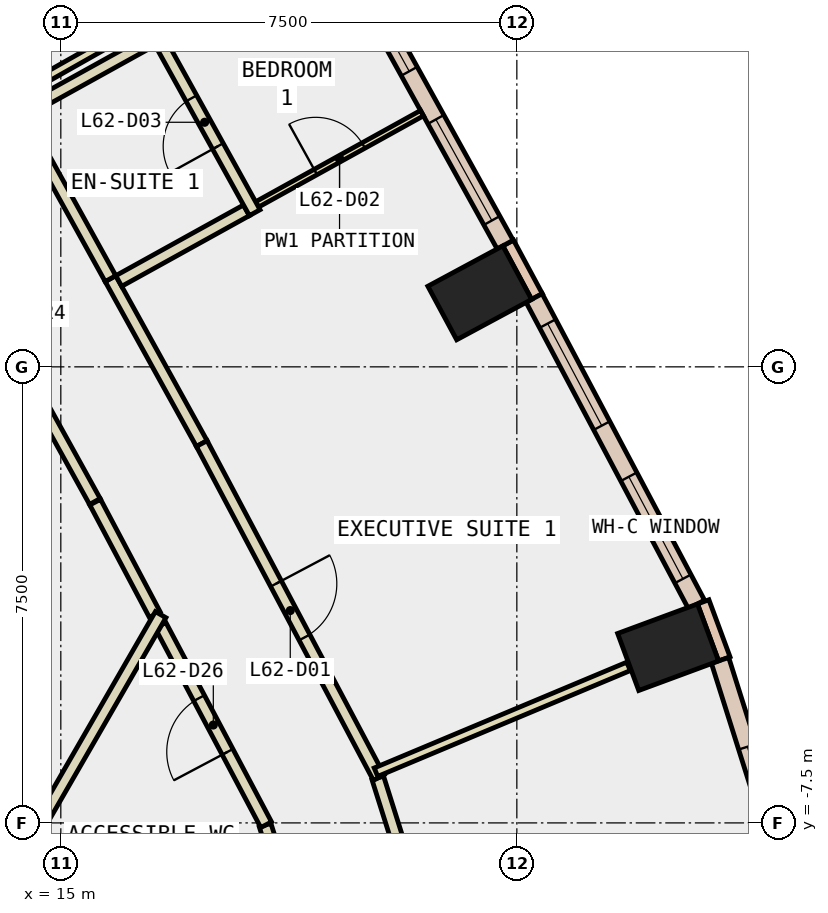
"""IFC4 building model, lengths in metres.
Left out: names, types, materials, properties, quantities, classifications, styles, units other than length and angle.
Written with IfcOpenShell. Run it as: python <this file> out.ifc"""

import sys

from ifc_helpers import new_model, si_unit, direction, frame, frame_2d, origin, origin_2d, place, context, subcontext, project, spatial, rectangle, extrude, element, fill, save


model = new_model("IFC4")
c1 = context("Model", 3, precision=1e-05, world=origin(), true_north=direction((0.0, 1.0)))
c2 = subcontext(c1, "Body", "Model", "MODEL_VIEW")
j1 = project(units=[si_unit("LENGTHUNIT", "METRE"), si_unit("PLANEANGLEUNIT", "RADIAN")], contexts=[c1])
p1 = place(None, origin())
s1 = spatial("IfcSite", under=j1, at=p1, CompositionType="ELEMENT")
p2 = place(p1, origin())
s2 = spatial("IfcBuilding", under=s1, at=p2, CompositionType="ELEMENT")
p3 = place(p2, frame((0.0, 0.0, 270.2)))
s3 = spatial("IfcBuildingStorey", under=s2, at=p3, CompositionType="ELEMENT", Elevation=270.2)
for number, where, z_axis, x_axis in (
    (1, (24.988, -4.611, -0.34), (0.0, 0.0, 1.0), (-0.347, 0.938, 0.0)),
    (2, (21.89, 1.217, -0.34), (0.0, 0.0, 1.0), (-0.474, 0.881, 0.0)),
):
    element("IfcColumn", number, at=place(p3, frame(where, z_axis=z_axis, x_axis=x_axis)), inside=s3, PredefinedType="COLUMN", context=c2, shape_type="SweptSolid", body=[
        extrude(rectangle(XDim=1.0, YDim=1.4, at=origin_2d()), origin(), (0.0, 0.0, 1.0), 3.6),
    ])
p4 = place(p3, frame((7.578, -4.375, -0.34), z_axis=(0.0, 0.0, 1.0), x_axis=(0.866024315419, -0.5000018851, 0.0)))
e3 = element("IfcWall", 3, at=p4, inside=s3, PredefinedType="SHEAR", context=c2, shape_type="SweptSolid", body=[
    extrude(rectangle(XDim=9.0, YDim=0.8, at=frame_2d((4.5, 0.0))), origin(), (0.0, 0.0, 1.0), 3.6),
])
p5 = place(p3, frame((25.912, -4.803, 0.0), z_axis=(0.0, 0.0, 1.0), x_axis=(-0.347107644204, 0.937825294677, 0.0)))
e4 = element("IfcWall", 4, at=p5, inside=s3, PredefinedType="STANDARD", context=c2, shape_type="SweptSolid", body=[
    extrude(rectangle(XDim=1.0, YDim=0.2, at=frame_2d((0.5, 0.0))), origin(), (0.0, 0.0, 1.0), 3.26),
])
p6 = place(p3, frame((22.831, 1.156, 0.0), z_axis=(0.0, 0.0, 1.0), x_axis=(-0.473852444207, 0.880604259085, 0.0)))
e5 = element("IfcWall", 5, at=p6, inside=s3, PredefinedType="STANDARD", context=c2, shape_type="SweptSolid", body=[
    extrude(rectangle(XDim=1.0, YDim=0.2, at=frame_2d((0.5, 0.0))), origin(), (0.0, 0.0, 1.0), 3.26),
])
p7 = place(p3, frame((27.161, -9.004, 0.0), z_axis=(0.0, 0.0, 1.0), x_axis=(-0.30108868778, 0.953596142028, 0.0)))
e6 = element("IfcWall", 6, at=p7, inside=s3, PredefinedType="STANDARD", context=c2, shape_type="SweptSolid", body=[
    extrude(rectangle(XDim=4.38, YDim=0.3, at=frame_2d((2.19, 0.0))), origin(), (0.0, 0.0, 1.0), 3.26),
])
p8 = place(p7, frame((1.49, 0.0, 0.9)))
e7 = element("IfcOpeningElement", 7, at=p8, cuts=e6, PredefinedType="OPENING", context=c2, shape_type="SweptSolid", body=[
    extrude(rectangle(XDim=1.4, YDim=2.0, at=frame_2d((0.7, 1.0))), frame((0.0, 0.16, 0.0), z_axis=(0.0, -1.0, 0.0), x_axis=(1.0, 0.0, 0.0)), (0.0, 0.0, 1.0), 0.32),
])
p9 = place(p3, frame((25.454, -3.907, 0.0), z_axis=(0.0, 0.0, 1.0), x_axis=(-0.468220106253, 0.883611867338, 0.0)))
e8 = element("IfcWall", 8, at=p9, inside=s3, PredefinedType="STANDARD", context=c2, shape_type="SweptSolid", body=[
    extrude(rectangle(XDim=5.703, YDim=0.3, at=frame_2d((2.852, 0.0))), origin(), (0.0, 0.0, 1.0), 3.26),
])
p10 = place(p9, frame((0.476, 0.0, 0.9)))
e9 = element("IfcOpeningElement", 9, at=p10, cuts=e8, PredefinedType="OPENING", context=c2, shape_type="SweptSolid", body=[
    extrude(rectangle(XDim=1.9, YDim=2.0, at=frame_2d((0.95, 1.0))), frame((0.0, 0.16, 0.0), z_axis=(0.0, -1.0, 0.0), x_axis=(1.0, 0.0, 0.0)), (0.0, 0.0, 1.0), 0.32),
])
p11 = place(p9, frame((3.327, 0.0, 0.9)))
e10 = element("IfcOpeningElement", 10, at=p11, cuts=e8, PredefinedType="OPENING", context=c2, shape_type="SweptSolid", body=[
    extrude(rectangle(XDim=1.9, YDim=2.0, at=frame_2d((0.95, 1.0))), frame((0.0, 0.16, 0.0), z_axis=(0.0, -1.0, 0.0), x_axis=(1.0, 0.0, 0.0)), (0.0, 0.0, 1.0), 0.32),
])
p12 = place(p3, frame((22.308, 2.01, 0.0), z_axis=(0.0, 0.0, 1.0), x_axis=(-0.484260568952, 0.874923826032, 0.0)))
e11 = element("IfcWall", 11, at=p12, inside=s3, PredefinedType="STANDARD", context=c2, shape_type="SweptSolid", body=[
    extrude(rectangle(XDim=5.611, YDim=0.3, at=frame_2d((2.805, 0.0))), origin(), (0.0, 0.0, 1.0), 3.26),
])
p13 = place(p12, frame((0.453, 0.0, 0.9)))
e12 = element("IfcOpeningElement", 12, at=p13, cuts=e11, PredefinedType="OPENING", context=c2, shape_type="SweptSolid", body=[
    extrude(rectangle(XDim=1.9, YDim=2.0, at=frame_2d((0.95, 1.0))), frame((0.0, 0.16, 0.0), z_axis=(0.0, -1.0, 0.0), x_axis=(1.0, 0.0, 0.0)), (0.0, 0.0, 1.0), 0.32),
])
p14 = place(p12, frame((3.258, 0.0, 0.9)))
e13 = element("IfcOpeningElement", 13, at=p14, cuts=e11, PredefinedType="OPENING", context=c2, shape_type="SweptSolid", body=[
    extrude(rectangle(XDim=1.9, YDim=2.0, at=frame_2d((0.95, 1.0))), frame((0.0, 0.16, 0.0), z_axis=(0.0, -1.0, 0.0), x_axis=(1.0, 0.0, 0.0)), (0.0, 0.0, 1.0), 0.32),
])
p15 = place(p3, frame((16.545, -4.074, 0.0), z_axis=(0.0, 0.0, 1.0), x_axis=(-0.468321873419, 0.883557934081, 0.0)))
e14 = element("IfcWall", 14, at=p15, inside=s3, PredefinedType="PARTITIONING", context=c2, shape_type="SweptSolid", body=[
    extrude(rectangle(XDim=2.093, YDim=0.2, at=frame_2d((1.046, 0.0))), origin(), (0.0, 0.0, 1.0), 3.26),
])
p16 = place(p3, frame((15.56, -2.214, 0.0), z_axis=(0.0, 0.0, 1.0), x_axis=(-0.484323615817, 0.874888927329, 0.0)))
e15 = element("IfcWall", 15, at=p16, inside=s3, PredefinedType="PARTITIONING", context=c2, shape_type="SweptSolid", body=[
    extrude(rectangle(XDim=4.747, YDim=0.2, at=frame_2d((2.374, 0.0))), origin(), (0.0, 0.0, 1.0), 3.26),
])
p17 = place(p16, frame((1.874, 0.0, 0.0)))
e16 = element("IfcOpeningElement", 16, at=p17, cuts=e15, PredefinedType="OPENING", context=c2, shape_type="SweptSolid", body=[
    extrude(rectangle(XDim=1.0, YDim=2.1, at=frame_2d((0.5, 1.05))), frame((0.0, 0.11, 0.0), z_axis=(0.0, -1.0, 0.0), x_axis=(1.0, 0.0, 0.0)), (0.0, 0.0, 1.0), 0.22),
])
p18 = place(p3, frame((19.104, -9.891, 0.0), z_axis=(0.0, 0.0, 1.0), x_axis=(-0.301325410186, 0.953521366922, 0.0)))
e17 = element("IfcWall", 17, at=p18, inside=s3, PredefinedType="PARTITIONING", context=c2, shape_type="SweptSolid", body=[
    extrude(rectangle(XDim=2.469, YDim=0.2, at=frame_2d((1.234, 0.0))), origin(), (0.0, 0.0, 1.0), 3.26),
])
p19 = place(p3, frame((18.377, -7.53, 0.0), z_axis=(0.0, 0.0, 1.0), x_axis=(-0.468214048123, 0.883615077474, 0.0)))
e18 = element("IfcWall", 18, at=p19, inside=s3, PredefinedType="PARTITIONING", context=c2, shape_type="SweptSolid", body=[
    extrude(rectangle(XDim=3.712, YDim=0.2, at=frame_2d((1.856, 0.0))), origin(), (0.0, 0.0, 1.0), 3.26),
])
p20 = place(p19, frame((1.356, 0.0, 0.0)))
e19 = element("IfcOpeningElement", 19, at=p20, cuts=e18, PredefinedType="OPENING", context=c2, shape_type="SweptSolid", body=[
    extrude(rectangle(XDim=1.0, YDim=2.1, at=frame_2d((0.5, 1.05))), frame((0.0, 0.11, 0.0), z_axis=(0.0, -1.0, 0.0), x_axis=(1.0, 0.0, 0.0)), (0.0, 0.0, 1.0), 0.22),
])
p21 = place(p3, frame((20.213, -6.761, 0.0), z_axis=(0.0, 0.0, 1.0), x_axis=(0.301331608119, -0.953519408271, 0.0)))
e20 = element("IfcWall", 20, at=p21, inside=s3, PredefinedType="PARTITIONING", context=c2, shape_type="SweptSolid", body=[
    extrude(rectangle(XDim=3.209, YDim=0.2, at=frame_2d((1.604, 0.0))), origin(), (0.0, 0.0, 1.0), 3.26),
])
p22 = place(p3, frame((15.817, 1.451, 0.0), z_axis=(0.0, 0.0, 1.0), x_axis=(0.48417811398, -0.874969458863, 0.0)))
e21 = element("IfcWall", 21, at=p22, inside=s3, PredefinedType="PARTITIONING", context=c2, shape_type="SweptSolid", body=[
    extrude(rectangle(XDim=3.101, YDim=0.2, at=frame_2d((1.55, 0.0))), origin(), (0.0, 0.0, 1.0), 3.26),
])
p23 = place(p3, frame((17.318, -1.262, 0.0), z_axis=(0.0, 0.0, 1.0), x_axis=(0.468313568794, -0.883562335822, 0.0)))
e22 = element("IfcWall", 22, at=p23, inside=s3, PredefinedType="PARTITIONING", context=c2, shape_type="SweptSolid", body=[
    extrude(rectangle(XDim=6.216, YDim=0.2, at=frame_2d((3.108, 0.0))), origin(), (0.0, 0.0, 1.0), 3.26),
])
p24 = place(p23, frame((2.608, 0.0, 0.0)))
e23 = element("IfcOpeningElement", 23, at=p24, cuts=e22, PredefinedType="OPENING", context=c2, shape_type="SweptSolid", body=[
    extrude(rectangle(XDim=1.0, YDim=2.1, at=frame_2d((0.5, 1.05))), frame((0.0, 0.11, 0.0), z_axis=(0.0, -1.0, 0.0), x_axis=(1.0, 0.0, 0.0)), (0.0, 0.0, 1.0), 0.22),
])
p25 = place(p3, frame((14.267, 4.25, 0.0), z_axis=(0.0, 0.0, 1.0), x_axis=(0.4843920198, -0.874851056554, 0.0)))
e24 = element("IfcWall", 24, at=p25, inside=s3, PredefinedType="PARTITIONING", context=c2, shape_type="SweptSolid", body=[
    extrude(rectangle(XDim=3.199, YDim=0.2, at=frame_2d((1.6, 0.0))), origin(), (0.0, 0.0, 1.0), 3.26),
])
p26 = place(p3, frame((16.642, -4.075, 0.0), z_axis=(0.0, 0.0, 1.0), x_axis=(-0.49980426207, -0.866138383641, 0.0)))
e25 = element("IfcWall", 25, at=p26, inside=s3, PredefinedType="PARTITIONING", context=c2, shape_type="SweptSolid", body=[
    extrude(rectangle(XDim=4.392, YDim=0.2, at=frame_2d((2.196, 0.0))), origin(), (0.0, 0.0, 1.0), 3.26),
])
p27 = place(p3, frame((20.183, -6.666, 0.0), z_axis=(0.0, 0.0, 1.0), x_axis=(0.922347108299, 0.386362280525, 0.0)))
e26 = element("IfcWall", 26, at=p27, inside=s3, PredefinedType="PARTITIONING", context=c2, shape_type="SweptSolid", body=[
    extrude(rectangle(XDim=4.503, YDim=0.15, at=frame_2d((2.252, 0.0))), origin(), (0.0, 0.0, 1.0), 3.26),
])
p28 = place(p3, frame((18.228, 2.671, 0.0), z_axis=(0.0, 0.0, 1.0), x_axis=(0.874895591854, 0.484311576729, 0.0)))
e27 = element("IfcWall", 27, at=p28, inside=s3, PredefinedType="PARTITIONING", context=c2, shape_type="SweptSolid", body=[
    extrude(rectangle(XDim=3.1, YDim=0.1, at=frame_2d((1.55, 0.0))), origin(), (0.0, 0.0, 1.0), 3.26),
])
p29 = place(p28, frame((1.1, 0.0, 0.0)))
e28 = element("IfcOpeningElement", 28, at=p29, cuts=e27, PredefinedType="OPENING", context=c2, shape_type="SweptSolid", body=[
    extrude(rectangle(XDim=0.9, YDim=2.1, at=frame_2d((0.45, 1.05))), frame((0.0, 0.06, 0.0), z_axis=(0.0, -1.0, 0.0), x_axis=(1.0, 0.0, 0.0)), (0.0, 0.0, 1.0), 0.12),
])
p30 = place(p3, frame((15.953, 1.412, 0.0), z_axis=(0.0, 0.0, 1.0), x_axis=(0.875014790305, 0.484096185429, 0.0)))
e29 = element("IfcWall", 29, at=p30, inside=s3, PredefinedType="PARTITIONING", context=c2, shape_type="SweptSolid", body=[
    extrude(rectangle(XDim=2.4, YDim=0.2, at=frame_2d((1.2, 0.0))), origin(), (0.0, 0.0, 1.0), 3.26),
])
p31 = place(p3, frame((18.189, 2.535, 0.0), z_axis=(0.0, 0.0, 1.0), x_axis=(-0.484447408253, 0.874820386501, 0.0)))
e30 = element("IfcWall", 30, at=p31, inside=s3, PredefinedType="PARTITIONING", context=c2, shape_type="SweptSolid", body=[
    extrude(rectangle(XDim=3.4, YDim=0.2, at=frame_2d((1.7, 0.0))), origin(), (0.0, 0.0, 1.0), 3.26),
])
p32 = place(p31, frame((1.25, 0.0, 0.0)))
e31 = element("IfcOpeningElement", 31, at=p32, cuts=e30, PredefinedType="OPENING", context=c2, shape_type="SweptSolid", body=[
    extrude(rectangle(XDim=0.9, YDim=2.1, at=frame_2d((0.45, 1.05))), frame((0.0, 0.11, 0.0), z_axis=(0.0, -1.0, 0.0), x_axis=(1.0, 0.0, 0.0)), (0.0, 0.0, 1.0), 0.22),
])
p33 = place(p3, frame((16.503, 5.374, 0.0), z_axis=(0.0, 0.0, 1.0), x_axis=(-0.874847389013, -0.484398643615, 0.0)))
e32 = element("IfcWall", 32, at=p33, inside=s3, PredefinedType="PARTITIONING", context=c2, shape_type="SweptSolid", body=[
    extrude(rectangle(XDim=2.5, YDim=0.2, at=frame_2d((1.25, 0.0))), origin(), (0.0, 0.0, 1.0), 3.26),
])
p34 = place(p3, frame((14.083, 4.377, 0.0), z_axis=(0.0, 0.0, 1.0), x_axis=(0.870415885751, 0.492317159799, 0.0)))
e33 = element("IfcWall", 33, at=p34, inside=s3, PredefinedType="PARTITIONING", context=c2, shape_type="SweptSolid", body=[
    extrude(rectangle(XDim=4.581, YDim=0.15, at=frame_2d((2.29, 0.0))), origin(), (0.0, 0.0, 1.0), 3.26),
])
p35 = place(p8, origin())
e34 = element("IfcWindow", 34, at=p35, inside=s3, PartitioningType="SINGLE_PANEL", PredefinedType="WINDOW", context=c2, shape_type="SweptSolid", body=[
    extrude(rectangle(XDim=1.4, YDim=2.0, at=frame_2d((0.7, 1.0))), frame((0.0, 0.03, 0.0), z_axis=(0.0, -1.0, 0.0), x_axis=(1.0, 0.0, 0.0)), (0.0, 0.0, 1.0), 0.06),
])
fill(e7, e34)
p36 = place(p10, origin())
e35 = element("IfcWindow", 35, at=p36, inside=s3, PartitioningType="SINGLE_PANEL", PredefinedType="WINDOW", context=c2, shape_type="SweptSolid", body=[
    extrude(rectangle(XDim=1.9, YDim=2.0, at=frame_2d((0.95, 1.0))), frame((0.0, 0.03, 0.0), z_axis=(0.0, -1.0, 0.0), x_axis=(1.0, 0.0, 0.0)), (0.0, 0.0, 1.0), 0.06),
])
fill(e9, e35)
p37 = place(p11, origin())
e36 = element("IfcWindow", 36, at=p37, inside=s3, PartitioningType="SINGLE_PANEL", PredefinedType="WINDOW", context=c2, shape_type="SweptSolid", body=[
    extrude(rectangle(XDim=1.9, YDim=2.0, at=frame_2d((0.95, 1.0))), frame((0.0, 0.03, 0.0), z_axis=(0.0, -1.0, 0.0), x_axis=(1.0, 0.0, 0.0)), (0.0, 0.0, 1.0), 0.06),
])
fill(e10, e36)
p38 = place(p13, origin())
e37 = element("IfcWindow", 37, at=p38, inside=s3, PartitioningType="SINGLE_PANEL", PredefinedType="WINDOW", context=c2, shape_type="SweptSolid", body=[
    extrude(rectangle(XDim=1.9, YDim=2.0, at=frame_2d((0.95, 1.0))), frame((0.0, 0.03, 0.0), z_axis=(0.0, -1.0, 0.0), x_axis=(1.0, 0.0, 0.0)), (0.0, 0.0, 1.0), 0.06),
])
fill(e12, e37)
p39 = place(p14, origin())
e38 = element("IfcWindow", 38, at=p39, inside=s3, PartitioningType="SINGLE_PANEL", PredefinedType="WINDOW", context=c2, shape_type="SweptSolid", body=[
    extrude(rectangle(XDim=1.9, YDim=2.0, at=frame_2d((0.95, 1.0))), frame((0.0, 0.03, 0.0), z_axis=(0.0, -1.0, 0.0), x_axis=(1.0, 0.0, 0.0)), (0.0, 0.0, 1.0), 0.06),
])
fill(e13, e38)
p40 = place(p24, origin())
e39 = element("IfcDoor", 39, at=p40, inside=s3, OperationType="SINGLE_SWING_LEFT", PredefinedType="DOOR", context=c2, shape_type="SweptSolid", body=[
    extrude(rectangle(XDim=1.0, YDim=2.1, at=frame_2d((0.5, 1.05))), frame((0.0, 0.025, 0.0), z_axis=(0.0, -1.0, 0.0), x_axis=(1.0, 0.0, 0.0)), (0.0, 0.0, 1.0), 0.05),
])
fill(e23, e39)
p41 = place(p29, origin())
e40 = element("IfcDoor", 40, at=p41, inside=s3, OperationType="SINGLE_SWING_RIGHT", PredefinedType="DOOR", context=c2, shape_type="SweptSolid", body=[
    extrude(rectangle(XDim=0.9, YDim=2.1, at=frame_2d((0.45, 1.05))), frame((0.0, 0.025, 0.0), z_axis=(0.0, -1.0, 0.0), x_axis=(1.0, 0.0, 0.0)), (0.0, 0.0, 1.0), 0.05),
])
fill(e28, e40)
p42 = place(p32, origin())
e41 = element("IfcDoor", 41, at=p42, inside=s3, OperationType="SINGLE_SWING_LEFT", PredefinedType="DOOR", context=c2, shape_type="SweptSolid", body=[
    extrude(rectangle(XDim=0.9, YDim=2.1, at=frame_2d((0.45, 1.05))), frame((0.0, 0.025, 0.0), z_axis=(0.0, -1.0, 0.0), x_axis=(1.0, 0.0, 0.0)), (0.0, 0.0, 1.0), 0.05),
])
fill(e31, e41)
p43 = place(p20, origin())
e42 = element("IfcDoor", 42, at=p43, inside=s3, OperationType="SINGLE_SWING_RIGHT", PredefinedType="DOOR", context=c2, shape_type="SweptSolid", body=[
    extrude(rectangle(XDim=1.0, YDim=2.1, at=frame_2d((0.5, 1.05))), frame((0.0, 0.025, 0.0), z_axis=(0.0, -1.0, 0.0), x_axis=(1.0, 0.0, 0.0)), (0.0, 0.0, 1.0), 0.05),
])
fill(e19, e42)
save(model, sys.argv[1])
